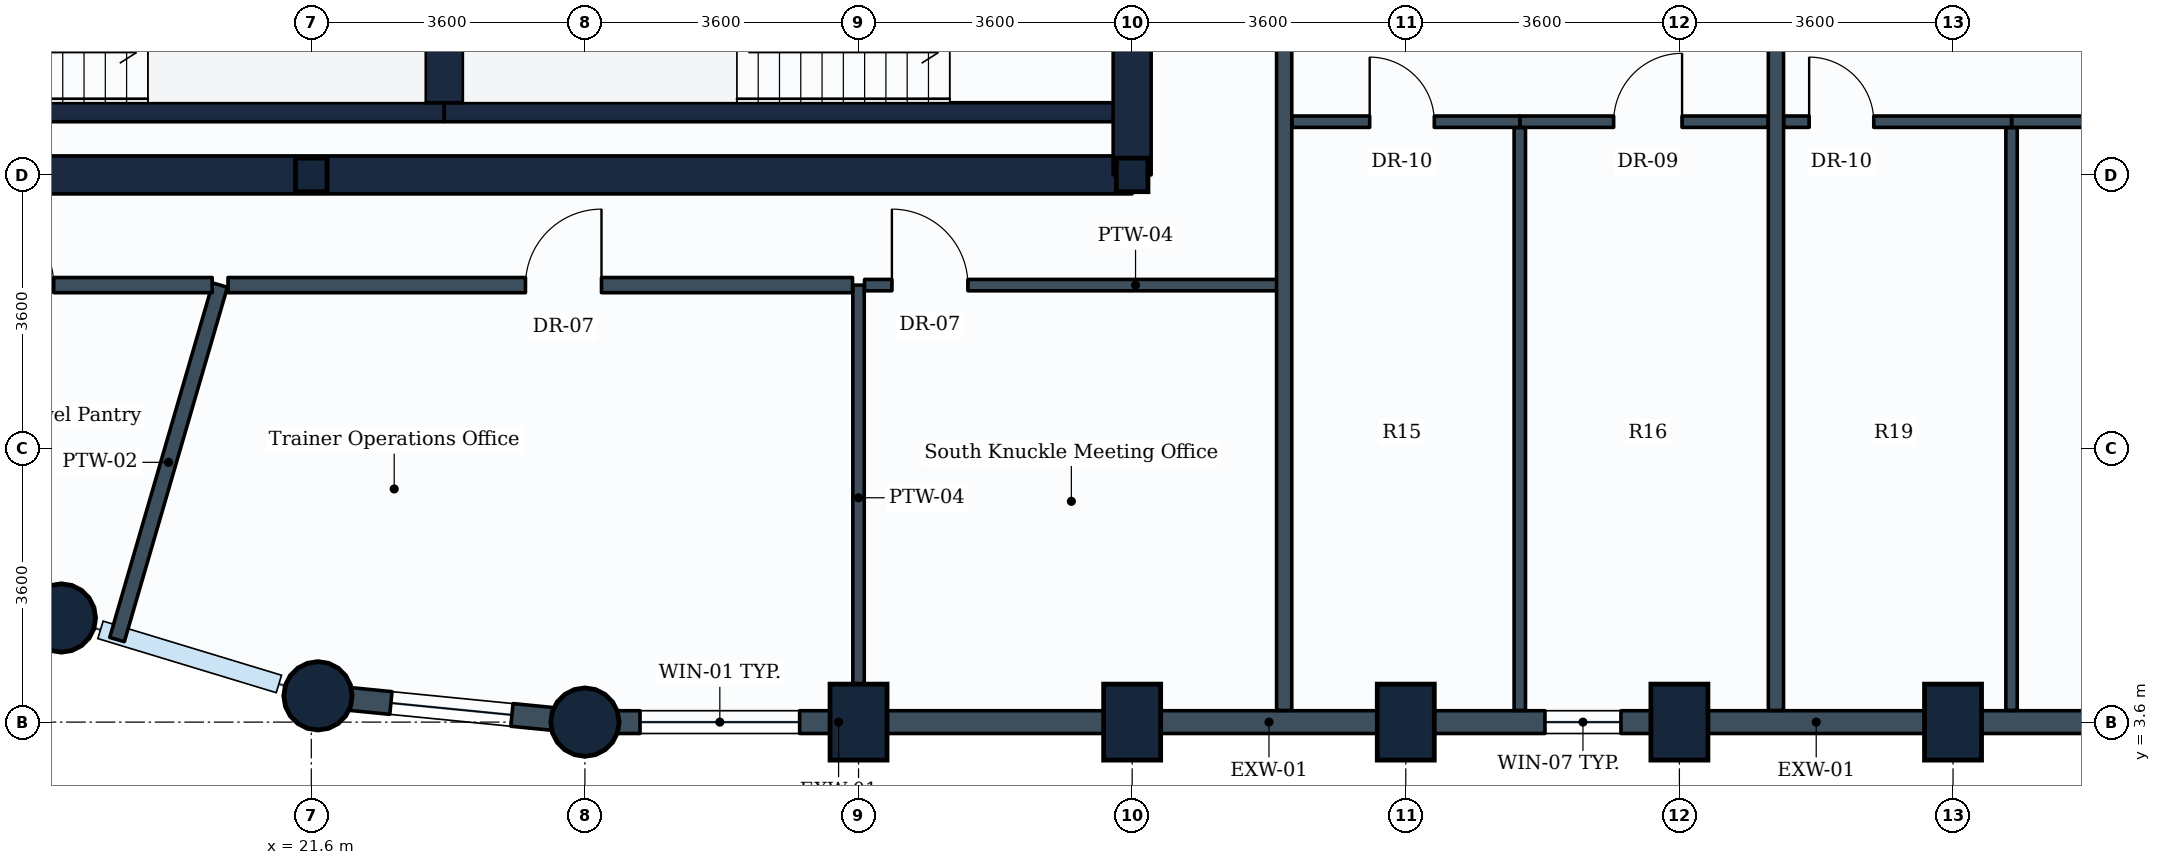
"""IFC4 building model, lengths in metres.
Left out: names, types, materials, properties, quantities, classifications, styles, units other than length and angle.
Written with IfcOpenShell. Run it as: python <this file> out.ifc"""

import sys

from ifc_helpers import new_model, si_unit, direction, frame, frame_2d, origin, origin_2d, place, context, subcontext, project, spatial, rectangle, circle, i_section, extrude, element, fill, save


model = new_model("IFC4")
c1 = context("Model", 3, precision=1e-05, world=origin(), true_north=direction((0.0, 1.0)))
c2 = subcontext(c1, "Body", "Model", "MODEL_VIEW")
j1 = project(units=[si_unit("LENGTHUNIT", "METRE"), si_unit("PLANEANGLEUNIT", "RADIAN")], contexts=[c1])
p1 = place(None, origin())
s1 = spatial("IfcSite", under=j1, at=p1, CompositionType="ELEMENT")
p2 = place(p1, origin())
s2 = spatial("IfcBuilding", under=s1, at=p2, CompositionType="ELEMENT")
p3 = place(p2, frame((0.0, 0.0, 146.6)))
s3 = spatial("IfcBuildingStorey", under=s2, at=p3, CompositionType="ELEMENT", Elevation=146.6)
p4 = place(p3, frame((18.312, 4.97, 0.0), z_axis=(0.0, 0.0, 1.0), x_axis=(1.0, 0.0, 0.0)))
e1 = element("IfcColumn", 1, at=p4, inside=s3, PredefinedType="COLUMN", context=c2, shape_type="SweptSolid", body=[
    extrude(circle(Radius=0.45, at=origin_2d()), origin(), (0.0, 0.0, 1.0), 3.8),
])
p5 = place(p3, frame((21.6, 10.8, 0.0), z_axis=(0.0, 0.0, 1.0), x_axis=(1.0, 0.0, 0.0)))
e2 = element("IfcColumn", 2, at=p5, inside=s3, PredefinedType="COLUMN", context=c2, shape_type="SweptSolid", body=[
    extrude(i_section(OverallWidth=0.416, OverallDepth=0.442, WebThickness=0.025, FlangeThickness=0.041, FilletRadius=0.015, at=origin_2d()), origin(), (0.0, 0.0, 1.0), 3.8),
])
for number, where, z_axis, x_axis in (
    (3, (21.688, 3.946, 0.0), (0.0, 0.0, 1.0), (1.0, 0.0, 0.0)),
    (4, (25.2, 3.6, 0.0), (0.0, 0.0, 1.0), (1.0, 0.0, 0.0)),
):
    element("IfcColumn", number, at=place(p3, frame(where, z_axis=z_axis, x_axis=x_axis)), inside=s3, PredefinedType="COLUMN", context=c2, shape_type="SweptSolid", body=[
        extrude(circle(Radius=0.45, at=origin_2d()), origin(), (0.0, 0.0, 1.0), 3.8),
    ])
for number, where, z_axis, x_axis in (
    (5, (28.8, 3.6, 0.0), (0.0, 0.0, 1.0), (1.0, 0.0, 0.0)),
    (6, (32.4, 3.6, 0.0), (0.0, 0.0, 1.0), (1.0, 0.0, 0.0)),
):
    element("IfcColumn", number, at=place(p3, frame(where, z_axis=z_axis, x_axis=x_axis)), inside=s3, PredefinedType="COLUMN", context=c2, shape_type="SweptSolid", body=[
        extrude(rectangle(XDim=0.75, YDim=1.0, at=origin_2d()), origin(), (0.0, 0.0, 1.0), 3.8),
    ])
p6 = place(p3, frame((32.4, 10.8, 0.0), z_axis=(0.0, 0.0, 1.0), x_axis=(1.0, 0.0, 0.0)))
e7 = element("IfcColumn", 7, at=p6, inside=s3, PredefinedType="COLUMN", context=c2, shape_type="SweptSolid", body=[
    extrude(i_section(OverallWidth=0.416, OverallDepth=0.442, WebThickness=0.025, FlangeThickness=0.041, FilletRadius=0.015, at=origin_2d()), origin(), (0.0, 0.0, 1.0), 3.8),
])
for number, where, z_axis, x_axis in (
    (8, (36.0, 3.6, 0.0), (0.0, 0.0, 1.0), (1.0, 0.0, 0.0)),
    (9, (39.6, 3.6, 0.0), (0.0, 0.0, 1.0), (1.0, 0.0, 0.0)),
    (10, (43.2, 3.6, 0.0), (0.0, 0.0, 1.0), (1.0, 0.0, 0.0)),
):
    element("IfcColumn", number, at=place(p3, frame(where, z_axis=z_axis, x_axis=x_axis)), inside=s3, PredefinedType="COLUMN", context=c2, shape_type="SweptSolid", body=[
        extrude(rectangle(XDim=0.75, YDim=1.0, at=origin_2d()), origin(), (0.0, 0.0, 1.0), 3.8),
    ])
p7 = place(p3, frame((28.8, 3.6, 0.0), z_axis=(0.0, 0.0, 1.0), x_axis=(-1.0, 0.0, 0.0)))
e11 = element("IfcWall", 11, at=p7, inside=s3, PredefinedType="STANDARD", context=c2, shape_type="SweptSolid", body=[
    extrude(rectangle(XDim=3.6, YDim=0.3, at=frame_2d((1.8, 0.0))), origin(), (0.0, 0.0, 1.0), 2.93),
])
p8 = place(p7, frame((0.775, 0.0, 0.85)))
e12 = element("IfcOpeningElement", 12, at=p8, cuts=e11, PredefinedType="OPENING", context=c2, shape_type="SweptSolid", body=[
    extrude(rectangle(XDim=2.1, YDim=1.35, at=frame_2d((1.05, 0.675))), frame((0.0, 0.16, 0.0), z_axis=(0.0, -1.0, 0.0), x_axis=(1.0, 0.0, 0.0)), (0.0, 0.0, 1.0), 0.32),
])
p9 = place(p3, frame((32.4, 3.6, 0.0), z_axis=(0.0, 0.0, 1.0), x_axis=(-1.0, 0.0, 0.0)))
e13 = element("IfcWall", 13, at=p9, inside=s3, PredefinedType="STANDARD", context=c2, shape_type="SweptSolid", body=[
    extrude(rectangle(XDim=3.6, YDim=0.3, at=frame_2d((1.8, 0.0))), origin(), (0.0, 0.0, 1.0), 2.93),
])
p10 = place(p3, frame((36.0, 3.6, 0.0), z_axis=(0.0, 0.0, 1.0), x_axis=(-1.0, 0.0, 0.0)))
e14 = element("IfcWall", 14, at=p10, inside=s3, PredefinedType="STANDARD", context=c2, shape_type="SweptSolid", body=[
    extrude(rectangle(XDim=3.6, YDim=0.3, at=frame_2d((1.8, 0.0))), origin(), (0.0, 0.0, 1.0), 2.93),
])
p11 = place(p3, frame((39.6, 3.6, 0.0), z_axis=(0.0, 0.0, 1.0), x_axis=(-1.0, 0.0, 0.0)))
e15 = element("IfcWall", 15, at=p11, inside=s3, PredefinedType="STANDARD", context=c2, shape_type="SweptSolid", body=[
    extrude(rectangle(XDim=3.6, YDim=0.3, at=frame_2d((1.8, 0.0))), origin(), (0.0, 0.0, 1.0), 2.93),
])
p12 = place(p11, frame((0.769, 0.0, 0.85)))
e16 = element("IfcOpeningElement", 16, at=p12, cuts=e15, PredefinedType="OPENING", context=c2, shape_type="SweptSolid", body=[
    extrude(rectangle(XDim=1.0, YDim=1.35, at=frame_2d((0.5, 0.675))), frame((0.0, 0.16, 0.0), z_axis=(0.0, -1.0, 0.0), x_axis=(1.0, 0.0, 0.0)), (0.0, 0.0, 1.0), 0.32),
])
p13 = place(p3, frame((43.2, 3.6, 0.0), z_axis=(0.0, 0.0, 1.0), x_axis=(-1.0, 0.0, 0.0)))
e17 = element("IfcWall", 17, at=p13, inside=s3, PredefinedType="STANDARD", context=c2, shape_type="SweptSolid", body=[
    extrude(rectangle(XDim=3.6, YDim=0.3, at=frame_2d((1.8, 0.0))), origin(), (0.0, 0.0, 1.0), 2.93),
])
p14 = place(p3, frame((46.8, 3.6, 0.0), z_axis=(0.0, 0.0, 1.0), x_axis=(-1.0, 0.0, 0.0)))
e18 = element("IfcWall", 18, at=p14, inside=s3, PredefinedType="STANDARD", context=c2, shape_type="SweptSolid", body=[
    extrude(rectangle(XDim=3.6, YDim=0.3, at=frame_2d((1.8, 0.0))), origin(), (0.0, 0.0, 1.0), 2.93),
])
p15 = place(p14, frame((0.769, 0.0, 0.85)))
e19 = element("IfcOpeningElement", 19, at=p15, cuts=e18, PredefinedType="OPENING", context=c2, shape_type="SweptSolid", body=[
    extrude(rectangle(XDim=1.0, YDim=1.35, at=frame_2d((0.5, 0.675))), frame((0.0, 0.16, 0.0), z_axis=(0.0, -1.0, 0.0), x_axis=(1.0, 0.0, 0.0)), (0.0, 0.0, 1.0), 0.32),
])
p16 = place(p3, frame((18.312, 4.97, 0.0), z_axis=(0.0, 0.0, 1.0), x_axis=(-0.881846862014, 0.471535907389, 0.0)))
e20 = element("IfcWall", 20, at=p16, inside=s3, PredefinedType="STANDARD", context=c2, shape_type="SweptSolid", body=[
    extrude(rectangle(XDim=3.529, YDim=0.3, at=frame_2d((1.765, 0.0))), origin(), (0.0, 0.0, 1.0), 2.93),
])
p17 = place(p16, frame((0.964, 0.0, 0.85)))
e21 = element("IfcOpeningElement", 21, at=p17, cuts=e20, PredefinedType="OPENING", context=c2, shape_type="SweptSolid", body=[
    extrude(rectangle(XDim=1.6, YDim=1.35, at=frame_2d((0.8, 0.675))), frame((0.0, 0.16, 0.0), z_axis=(0.0, -1.0, 0.0), x_axis=(1.0, 0.0, 0.0)), (0.0, 0.0, 1.0), 0.32),
])
p18 = place(p3, frame((25.2, 3.6, 0.0), z_axis=(0.0, 0.0, 1.0), x_axis=(-0.995183369056, 0.098030923459, 0.0)))
e22 = element("IfcWall", 22, at=p18, inside=s3, PredefinedType="STANDARD", context=c2, shape_type="SweptSolid", body=[
    extrude(rectangle(XDim=3.529, YDim=0.3, at=frame_2d((1.765, 0.0))), origin(), (0.0, 0.0, 1.0), 2.93),
])
p19 = place(p18, frame((0.965, 0.0, 0.85)))
e23 = element("IfcOpeningElement", 23, at=p19, cuts=e22, PredefinedType="OPENING", context=c2, shape_type="SweptSolid", body=[
    extrude(rectangle(XDim=1.6, YDim=1.35, at=frame_2d((0.8, 0.675))), frame((0.0, 0.16, 0.0), z_axis=(0.0, -1.0, 0.0), x_axis=(1.0, 0.0, 0.0)), (0.0, 0.0, 1.0), 0.32),
])
p20 = place(p3, frame((14.4, 10.8, 0.0), z_axis=(0.0, 0.0, 1.0), x_axis=(1.0, 0.0, 0.0)))
e24 = element("IfcWall", 24, at=p20, inside=s3, PredefinedType="SHEAR", context=c2, shape_type="SweptSolid", body=[
    extrude(rectangle(XDim=18.0, YDim=0.5, at=frame_2d((9.0, 0.0))), origin(), (0.0, 0.0, 1.0), 3.55),
])
p21 = place(p3, frame((32.4, 10.8, 0.0), z_axis=(0.0, 0.0, 1.0), x_axis=(0.0, 1.0, 0.0)))
e25 = element("IfcWall", 25, at=p21, inside=s3, PredefinedType="SHEAR", context=c2, shape_type="SweptSolid", body=[
    extrude(rectangle(XDim=14.4, YDim=0.5, at=frame_2d((7.2, 0.0))), origin(), (0.0, 0.0, 1.0), 3.55),
])
p22 = place(p21, frame((4.35, 0.0, 0.0)))
e26 = element("IfcOpeningElement", 26, at=p22, cuts=e25, PredefinedType="OPENING", context=c2, shape_type="SweptSolid", body=[
    extrude(rectangle(XDim=1.2, YDim=2.1, at=frame_2d((0.6, 1.05))), frame((0.0, 0.26, 0.0), z_axis=(0.0, -1.0, 0.0), x_axis=(1.0, 0.0, 0.0)), (0.0, 0.0, 1.0), 0.52),
])
p23 = place(p21, frame((10.0, 0.0, 0.0)))
e27 = element("IfcOpeningElement", 27, at=p23, cuts=e25, PredefinedType="OPENING", context=c2, shape_type="SweptSolid", body=[
    extrude(rectangle(XDim=1.2, YDim=2.1, at=frame_2d((0.6, 1.05))), frame((0.0, 0.26, 0.0), z_axis=(0.0, -1.0, 0.0), x_axis=(1.0, 0.0, 0.0)), (0.0, 0.0, 1.0), 0.52),
])
p24 = place(p3, frame((14.65, 11.625, 0.0), z_axis=(0.0, 0.0, 1.0), x_axis=(1.0, 0.0, 0.0)))
e28 = element("IfcWall", 28, at=p24, inside=s3, PredefinedType="SHEAR", context=c2, shape_type="SweptSolid", body=[
    extrude(rectangle(XDim=8.7, YDim=0.25, at=frame_2d((4.35, 0.0))), origin(), (0.0, 0.0, 1.0), 3.55),
])
p25 = place(p3, frame((23.35, 11.625, 0.0), z_axis=(0.0, 0.0, 1.0), x_axis=(1.0, 0.0, 0.0)))
e29 = element("IfcWall", 29, at=p25, inside=s3, PredefinedType="SHEAR", context=c2, shape_type="SweptSolid", body=[
    extrude(rectangle(XDim=8.8, YDim=0.25, at=frame_2d((4.4, 0.0))), origin(), (0.0, 0.0, 1.0), 3.55),
])
p26 = place(p3, frame((23.35, 11.75, 0.0), z_axis=(0.0, 0.0, 1.0), x_axis=(0.0, 1.0, 0.0)))
e30 = element("IfcWall", 30, at=p26, inside=s3, PredefinedType="SHEAR", context=c2, shape_type="SweptSolid", body=[
    extrude(rectangle(XDim=2.84, YDim=0.5, at=frame_2d((1.42, 0.0))), origin(), (0.0, 0.0, 1.0), 3.55),
])
p27 = place(p3, frame((28.8, 9.35, 0.0), z_axis=(0.0, 0.0, 1.0), x_axis=(0.0, -1.0, 0.0)))
e31 = element("IfcWall", 31, at=p27, inside=s3, PredefinedType="PARTITIONING", context=c2, shape_type="SweptSolid", body=[
    extrude(rectangle(XDim=5.596, YDim=0.15, at=frame_2d((2.798, 0.0))), origin(), (0.0, 0.0, 1.0), 3.535),
])
p28 = place(p3, frame((20.4, 9.35, 0.0), z_axis=(0.0, 0.0, 1.0), x_axis=(-0.27916607548, -0.960242835069, 0.0)))
e32 = element("IfcWall", 32, at=p28, inside=s3, PredefinedType="PARTITIONING", context=c2, shape_type="SweptSolid", body=[
    extrude(rectangle(XDim=4.857, YDim=0.2, at=frame_2d((2.429, 0.0))), origin(), (0.0, 0.0, 1.0), 2.93),
])
p29 = place(p3, frame((12.95, 9.35, 0.0), z_axis=(0.0, 0.0, 1.0), x_axis=(1.0, 0.0, 0.0)))
e33 = element("IfcWall", 33, at=p29, inside=s3, PredefinedType="PARTITIONING", context=c2, shape_type="SweptSolid", body=[
    extrude(rectangle(XDim=7.346, YDim=0.2, at=frame_2d((3.673, 0.0))), origin(), (0.0, 0.0, 1.0), 3.18),
])
p30 = place(p29, frame((4.261, 0.0, 0.0)))
e34 = element("IfcOpeningElement", 34, at=p30, cuts=e33, PredefinedType="OPENING", context=c2, shape_type="SweptSolid", body=[
    extrude(rectangle(XDim=1.0, YDim=2.1, at=frame_2d((0.5, 1.05))), frame((0.0, 0.11, 0.0), z_axis=(0.0, -1.0, 0.0), x_axis=(1.0, 0.0, 0.0)), (0.0, 0.0, 1.0), 0.22),
])
p31 = place(p3, frame((20.504, 9.35, 0.0), z_axis=(0.0, 0.0, 1.0), x_axis=(1.0, 0.0, 0.0)))
e35 = element("IfcWall", 35, at=p31, inside=s3, PredefinedType="PARTITIONING", context=c2, shape_type="SweptSolid", body=[
    extrude(rectangle(XDim=8.217, YDim=0.2, at=frame_2d((4.108, 0.0))), origin(), (0.0, 0.0, 1.0), 3.17),
])
p32 = place(p31, frame((3.914, 0.0, 0.0)))
e36 = element("IfcOpeningElement", 36, at=p32, cuts=e35, PredefinedType="OPENING", context=c2, shape_type="SweptSolid", body=[
    extrude(rectangle(XDim=1.0, YDim=2.1, at=frame_2d((0.5, 1.05))), frame((0.0, 0.11, 0.0), z_axis=(0.0, -1.0, 0.0), x_axis=(1.0, 0.0, 0.0)), (0.0, 0.0, 1.0), 0.22),
])
p33 = place(p3, frame((28.879, 9.35, 0.0), z_axis=(0.0, 0.0, 1.0), x_axis=(1.0, 0.0, 0.0)))
e37 = element("IfcWall", 37, at=p33, inside=s3, PredefinedType="PARTITIONING", context=c2, shape_type="SweptSolid", body=[
    extrude(rectangle(XDim=5.521, YDim=0.15, at=frame_2d((2.76, 0.0))), origin(), (0.0, 0.0, 1.0), 3.535),
])
p34 = place(p33, frame((0.36, 0.0, 0.0)))
e38 = element("IfcOpeningElement", 38, at=p34, cuts=e37, PredefinedType="OPENING", context=c2, shape_type="SweptSolid", body=[
    extrude(rectangle(XDim=1.0, YDim=2.1, at=frame_2d((0.5, 1.05))), frame((0.0, 0.085, 0.0), z_axis=(0.0, -1.0, 0.0), x_axis=(1.0, 0.0, 0.0)), (0.0, 0.0, 1.0), 0.17),
])
for number, where, z_axis, x_axis in (
    (39, (34.4, 3.754, 0.0), (0.0, 0.0, 1.0), (0.0, 1.0, 0.0)),
    (40, (40.87, 3.754, 0.0), (0.0, 0.0, 1.0), (0.0, 1.0, 0.0)),
):
    element("IfcWall", number, at=place(p3, frame(where, z_axis=z_axis, x_axis=x_axis)), inside=s3, PredefinedType="PARTITIONING", context=c2, shape_type="SweptSolid", body=[
        extrude(rectangle(XDim=14.096, YDim=0.2, at=frame_2d((7.048, 0.0))), origin(), (0.0, 0.0, 1.0), 2.93),
    ])
p35 = place(p3, frame((37.5, 11.5, 0.0), z_axis=(0.0, 0.0, 1.0), x_axis=(1.0, 0.0, 0.0)))
e41 = element("IfcWall", 41, at=p35, inside=s3, PredefinedType="PARTITIONING", context=c2, shape_type="SweptSolid", body=[
    extrude(rectangle(XDim=3.266, YDim=0.15, at=frame_2d((1.633, 0.0))), origin(), (0.0, 0.0, 1.0), 3.17),
])
p36 = place(p35, frame((1.235, 0.0, 0.0)))
e42 = element("IfcOpeningElement", 42, at=p36, cuts=e41, PredefinedType="OPENING", context=c2, shape_type="SweptSolid", body=[
    extrude(rectangle(XDim=0.9, YDim=2.1, at=frame_2d((0.45, 1.05))), frame((0.0, 0.085, 0.0), z_axis=(0.0, -1.0, 0.0), x_axis=(1.0, 0.0, 0.0)), (0.0, 0.0, 1.0), 0.17),
])
p37 = place(p3, frame((34.504, 11.5, 0.0), z_axis=(0.0, 0.0, 1.0), x_axis=(1.0, 0.0, 0.0)))
e43 = element("IfcWall", 43, at=p37, inside=s3, PredefinedType="PARTITIONING", context=c2, shape_type="SweptSolid", body=[
    extrude(rectangle(XDim=2.996, YDim=0.15, at=frame_2d((1.498, 0.0))), origin(), (0.0, 0.0, 1.0), 3.22),
])
p38 = place(p37, frame((1.021, 0.0, 0.0)))
e44 = element("IfcOpeningElement", 44, at=p38, cuts=e43, PredefinedType="OPENING", context=c2, shape_type="SweptSolid", body=[
    extrude(rectangle(XDim=0.85, YDim=2.1, at=frame_2d((0.425, 1.05))), frame((0.0, 0.085, 0.0), z_axis=(0.0, -1.0, 0.0), x_axis=(1.0, 0.0, 0.0)), (0.0, 0.0, 1.0), 0.17),
])
p39 = place(p3, frame((37.5, 3.754, 0.0), z_axis=(0.0, 0.0, 1.0), x_axis=(0.0, 1.0, 0.0)))
e45 = element("IfcWall", 45, at=p39, inside=s3, PredefinedType="PARTITIONING", context=c2, shape_type="SweptSolid", body=[
    extrude(rectangle(XDim=7.667, YDim=0.15, at=frame_2d((3.833, 0.0))), origin(), (0.0, 0.0, 1.0), 2.93),
])
p40 = place(p3, frame((43.97, 11.5, 0.0), z_axis=(0.0, 0.0, 1.0), x_axis=(1.0, 0.0, 0.0)))
e46 = element("IfcWall", 46, at=p40, inside=s3, PredefinedType="PARTITIONING", context=c2, shape_type="SweptSolid", body=[
    extrude(rectangle(XDim=3.266, YDim=0.15, at=frame_2d((1.633, 0.0))), origin(), (0.0, 0.0, 1.0), 3.17),
])
p41 = place(p40, frame((1.235, 0.0, 0.0)))
e47 = element("IfcOpeningElement", 47, at=p41, cuts=e46, PredefinedType="OPENING", context=c2, shape_type="SweptSolid", body=[
    extrude(rectangle(XDim=0.9, YDim=2.1, at=frame_2d((0.45, 1.05))), frame((0.0, 0.085, 0.0), z_axis=(0.0, -1.0, 0.0), x_axis=(1.0, 0.0, 0.0)), (0.0, 0.0, 1.0), 0.17),
])
p42 = place(p3, frame((40.974, 11.5, 0.0), z_axis=(0.0, 0.0, 1.0), x_axis=(1.0, 0.0, 0.0)))
e48 = element("IfcWall", 48, at=p42, inside=s3, PredefinedType="PARTITIONING", context=c2, shape_type="SweptSolid", body=[
    extrude(rectangle(XDim=2.996, YDim=0.15, at=frame_2d((1.498, 0.0))), origin(), (0.0, 0.0, 1.0), 3.18),
])
p43 = place(p42, frame((0.333, 0.0, 0.0)))
e49 = element("IfcOpeningElement", 49, at=p43, cuts=e48, PredefinedType="OPENING", context=c2, shape_type="SweptSolid", body=[
    extrude(rectangle(XDim=0.85, YDim=2.1, at=frame_2d((0.425, 1.05))), frame((0.0, 0.085, 0.0), z_axis=(0.0, -1.0, 0.0), x_axis=(1.0, 0.0, 0.0)), (0.0, 0.0, 1.0), 0.17),
])
p44 = place(p3, frame((43.97, 3.754, 0.0), z_axis=(0.0, 0.0, 1.0), x_axis=(0.0, 1.0, 0.0)))
e50 = element("IfcWall", 50, at=p44, inside=s3, PredefinedType="PARTITIONING", context=c2, shape_type="SweptSolid", body=[
    extrude(rectangle(XDim=7.667, YDim=0.15, at=frame_2d((3.833, 0.0))), origin(), (0.0, 0.0, 1.0), 2.93),
])
p45 = place(p8, origin())
e51 = element("IfcWindow", 51, at=p45, inside=s3, PartitioningType="SINGLE_PANEL", PredefinedType="WINDOW", context=c2, shape_type="SweptSolid", body=[
    extrude(rectangle(XDim=2.1, YDim=1.35, at=frame_2d((1.05, 0.675))), frame((0.0, 0.03, 0.0), z_axis=(0.0, -1.0, 0.0), x_axis=(1.0, 0.0, 0.0)), (0.0, 0.0, 1.0), 0.06),
])
fill(e12, e51)
p46 = place(p19, origin())
e52 = element("IfcWindow", 52, at=p46, inside=s3, PartitioningType="SINGLE_PANEL", PredefinedType="WINDOW", context=c2, shape_type="SweptSolid", body=[
    extrude(rectangle(XDim=1.6, YDim=1.35, at=frame_2d((0.8, 0.675))), frame((0.0, 0.03, 0.0), z_axis=(0.0, -1.0, 0.0), x_axis=(1.0, 0.0, 0.0)), (0.0, 0.0, 1.0), 0.06),
])
fill(e23, e52)
p47 = place(p30, origin())
e53 = element("IfcDoor", 53, at=p47, inside=s3, OperationType="SINGLE_SWING_LEFT", PredefinedType="DOOR", context=c2, shape_type="SweptSolid", body=[
    extrude(rectangle(XDim=1.0, YDim=2.1, at=frame_2d((0.5, 1.05))), frame((0.0, 0.025, 0.0), z_axis=(0.0, -1.0, 0.0), x_axis=(1.0, 0.0, 0.0)), (0.0, 0.0, 1.0), 0.05),
])
fill(e34, e53)
p48 = place(p32, origin())
e54 = element("IfcDoor", 54, at=p48, inside=s3, OperationType="SINGLE_SWING_RIGHT", PredefinedType="DOOR", context=c2, shape_type="SweptSolid", body=[
    extrude(rectangle(XDim=1.0, YDim=2.1, at=frame_2d((0.5, 1.05))), frame((0.0, 0.025, 0.0), z_axis=(0.0, -1.0, 0.0), x_axis=(1.0, 0.0, 0.0)), (0.0, 0.0, 1.0), 0.05),
])
fill(e36, e54)
p49 = place(p34, origin())
e55 = element("IfcDoor", 55, at=p49, inside=s3, OperationType="SINGLE_SWING_LEFT", PredefinedType="DOOR", context=c2, shape_type="SweptSolid", body=[
    extrude(rectangle(XDim=1.0, YDim=2.1, at=frame_2d((0.5, 1.05))), frame((0.0, 0.025, 0.0), z_axis=(0.0, -1.0, 0.0), x_axis=(1.0, 0.0, 0.0)), (0.0, 0.0, 1.0), 0.05),
])
fill(e38, e55)
p50 = place(p36, origin())
e56 = element("IfcDoor", 56, at=p50, inside=s3, OperationType="SINGLE_SWING_RIGHT", PredefinedType="DOOR", context=c2, shape_type="SweptSolid", body=[
    extrude(rectangle(XDim=0.9, YDim=2.1, at=frame_2d((0.45, 1.05))), frame((0.0, 0.025, 0.0), z_axis=(0.0, -1.0, 0.0), x_axis=(1.0, 0.0, 0.0)), (0.0, 0.0, 1.0), 0.05),
])
fill(e42, e56)
p51 = place(p38, origin())
e57 = element("IfcDoor", 57, at=p51, inside=s3, OperationType="SINGLE_SWING_LEFT", PredefinedType="DOOR", context=c2, shape_type="SweptSolid", body=[
    extrude(rectangle(XDim=0.85, YDim=2.1, at=frame_2d((0.425, 1.05))), frame((0.0, 0.025, 0.0), z_axis=(0.0, -1.0, 0.0), x_axis=(1.0, 0.0, 0.0)), (0.0, 0.0, 1.0), 0.05),
])
fill(e44, e57)
p52 = place(p43, origin())
e58 = element("IfcDoor", 58, at=p52, inside=s3, OperationType="SINGLE_SWING_LEFT", PredefinedType="DOOR", context=c2, shape_type="SweptSolid", body=[
    extrude(rectangle(XDim=0.85, YDim=2.1, at=frame_2d((0.425, 1.05))), frame((0.0, 0.025, 0.0), z_axis=(0.0, -1.0, 0.0), x_axis=(1.0, 0.0, 0.0)), (0.0, 0.0, 1.0), 0.05),
])
fill(e49, e58)
p53 = place(p12, origin())
e59 = element("IfcWindow", 59, at=p53, inside=s3, PartitioningType="SINGLE_PANEL", PredefinedType="WINDOW", context=c2, shape_type="SweptSolid", body=[
    extrude(rectangle(XDim=1.0, YDim=1.35, at=frame_2d((0.5, 0.675))), frame((0.0, 0.03, 0.0), z_axis=(0.0, -1.0, 0.0), x_axis=(1.0, 0.0, 0.0)), (0.0, 0.0, 1.0), 0.06),
])
fill(e16, e59)
save(model, sys.argv[1])
